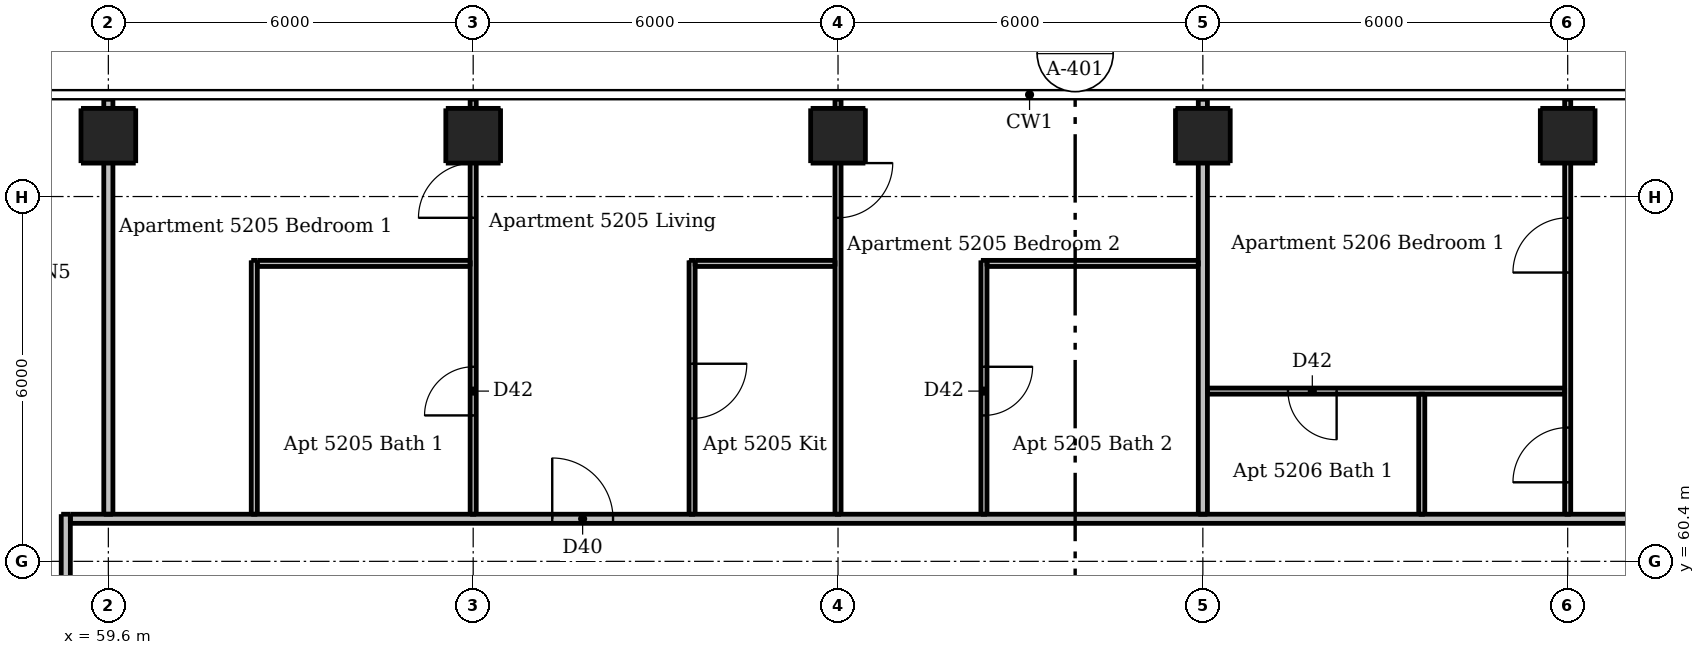
"""IFC4 building model, lengths in metres.
Left out: names, types, materials, properties, quantities, classifications, styles, units other than length and angle.
Written with IfcOpenShell. Run it as: python <this file> out.ifc"""

import sys

from ifc_helpers import new_model, si_unit, direction, frame, frame_2d, origin, origin_2d, place, context, subcontext, project, spatial, rectangle, extrude, element, fill, save


model = new_model("IFC4")
c1 = context("Model", 3, precision=1e-05, world=origin(), true_north=direction((0.0, 1.0)))
c2 = subcontext(c1, "Body", "Model", "MODEL_VIEW")
j1 = project(units=[si_unit("LENGTHUNIT", "METRE"), si_unit("PLANEANGLEUNIT", "RADIAN")], contexts=[c1])
p1 = place(None, origin())
s1 = spatial("IfcSite", under=j1, at=p1, CompositionType="ELEMENT")
p2 = place(p1, origin())
s2 = spatial("IfcBuilding", under=s1, at=p2, CompositionType="ELEMENT")
p3 = place(p2, frame((0.0, 0.0, 196.9)))
s3 = spatial("IfcBuildingStorey", under=s2, at=p3, CompositionType="ELEMENT", Elevation=196.9)
for number, where, z_axis, x_axis in (
    (1, (59.6, 67.4, 0.0), (0.0, 0.0, 1.0), (1.0, 0.0, 0.0)),
    (2, (65.6, 67.4, 0.0), (0.0, 0.0, 1.0), (1.0, 0.0, 0.0)),
    (3, (71.6, 67.4, 0.0), (0.0, 0.0, 1.0), (1.0, 0.0, 0.0)),
    (4, (77.6, 67.4, 0.0), (0.0, 0.0, 1.0), (1.0, 0.0, 0.0)),
    (5, (83.6, 67.4, 0.0), (0.0, 0.0, 1.0), (1.0, 0.0, 0.0)),
):
    element("IfcColumn", number, at=place(p3, frame(where, z_axis=z_axis, x_axis=x_axis)), inside=s3, PredefinedType="COLUMN", context=c2, shape_type="SweptSolid", body=[
        extrude(rectangle(XDim=0.9, YDim=0.9, at=origin_2d()), origin(), (0.0, 0.0, 1.0), 3.05),
    ])
p4 = place(p3, frame((62.0, 61.175, 0.0), z_axis=(0.0, 0.0, 1.0), x_axis=(0.0, 1.0, 0.0)))
e6 = element("IfcWall", 6, at=p4, inside=s3, PredefinedType="PARTITIONING", context=c2, shape_type="SweptSolid", body=[
    extrude(rectangle(XDim=4.175, YDim=0.1, at=frame_2d((2.087, 0.0))), origin(), (0.0, 0.0, 1.0), 3.05),
])
p5 = place(p3, frame((65.6, 61.175, 0.0), z_axis=(0.0, 0.0, 1.0), x_axis=(0.0, 1.0, 0.0)))
e7 = element("IfcWall", 7, at=p5, inside=s3, PredefinedType="PARTITIONING", context=c2, shape_type="SweptSolid", body=[
    extrude(rectangle(XDim=6.825, YDim=0.1, at=frame_2d((3.413, 0.0))), origin(), (0.0, 0.0, 1.0), 2.516),
])
p6 = place(p5, frame((4.875, 0.0, 0.0)))
e8 = element("IfcOpeningElement", 8, at=p6, cuts=e7, PredefinedType="OPENING", context=c2, shape_type="SweptSolid", body=[
    extrude(rectangle(XDim=0.9, YDim=2.1, at=frame_2d((0.45, 1.05))), frame((0.0, 0.06, 0.0), z_axis=(0.0, -1.0, 0.0), x_axis=(1.0, 0.0, 0.0)), (0.0, 0.0, 1.0), 0.12),
])
p7 = place(p5, frame((1.625, 0.0, 0.0)))
e9 = element("IfcOpeningElement", 9, at=p7, cuts=e7, PredefinedType="OPENING", context=c2, shape_type="SweptSolid", body=[
    extrude(rectangle(XDim=0.8, YDim=2.1, at=frame_2d((0.4, 1.05))), frame((0.0, 0.06, 0.0), z_axis=(0.0, -1.0, 0.0), x_axis=(1.0, 0.0, 0.0)), (0.0, 0.0, 1.0), 0.12),
])
p8 = place(p3, frame((69.2, 65.35, 0.0), z_axis=(0.0, 0.0, 1.0), x_axis=(0.0, -1.0, 0.0)))
e10 = element("IfcWall", 10, at=p8, inside=s3, PredefinedType="PARTITIONING", context=c2, shape_type="SweptSolid", body=[
    extrude(rectangle(XDim=4.175, YDim=0.1, at=frame_2d((2.087, 0.0))), origin(), (0.0, 0.0, 1.0), 3.05),
])
p9 = place(p8, frame((1.7, 0.0, 0.0)))
e11 = element("IfcOpeningElement", 11, at=p9, cuts=e10, PredefinedType="OPENING", context=c2, shape_type="SweptSolid", body=[
    extrude(rectangle(XDim=0.9, YDim=2.1, at=frame_2d((0.45, 1.05))), frame((0.0, 0.06, 0.0), z_axis=(0.0, -1.0, 0.0), x_axis=(1.0, 0.0, 0.0)), (0.0, 0.0, 1.0), 0.12),
])
p10 = place(p3, frame((71.6, 68.0, 0.0), z_axis=(0.0, 0.0, 1.0), x_axis=(0.0, -1.0, 0.0)))
e12 = element("IfcWall", 12, at=p10, inside=s3, PredefinedType="PARTITIONING", context=c2, shape_type="SweptSolid", body=[
    extrude(rectangle(XDim=6.825, YDim=0.1, at=frame_2d((3.413, 0.0))), origin(), (0.0, 0.0, 1.0), 2.516),
])
p11 = place(p10, frame((1.05, 0.0, 0.0)))
e13 = element("IfcOpeningElement", 13, at=p11, cuts=e12, PredefinedType="OPENING", context=c2, shape_type="SweptSolid", body=[
    extrude(rectangle(XDim=0.9, YDim=2.1, at=frame_2d((0.45, 1.05))), frame((0.0, 0.06, 0.0), z_axis=(0.0, -1.0, 0.0), x_axis=(1.0, 0.0, 0.0)), (0.0, 0.0, 1.0), 0.12),
])
p12 = place(p3, frame((74.0, 65.35, 0.0), z_axis=(0.0, 0.0, 1.0), x_axis=(0.0, -1.0, 0.0)))
e14 = element("IfcWall", 14, at=p12, inside=s3, PredefinedType="PARTITIONING", context=c2, shape_type="SweptSolid", body=[
    extrude(rectangle(XDim=4.175, YDim=0.1, at=frame_2d((2.087, 0.0))), origin(), (0.0, 0.0, 1.0), 3.05),
])
p13 = place(p12, frame((1.75, 0.0, 0.0)))
e15 = element("IfcOpeningElement", 15, at=p13, cuts=e14, PredefinedType="OPENING", context=c2, shape_type="SweptSolid", body=[
    extrude(rectangle(XDim=0.8, YDim=2.1, at=frame_2d((0.4, 1.05))), frame((0.0, 0.06, 0.0), z_axis=(0.0, -1.0, 0.0), x_axis=(1.0, 0.0, 0.0)), (0.0, 0.0, 1.0), 0.12),
])
p14 = place(p3, frame((81.2, 61.175, 0.0), z_axis=(0.0, 0.0, 1.0), x_axis=(0.0, 1.0, 0.0)))
e16 = element("IfcWall", 16, at=p14, inside=s3, PredefinedType="PARTITIONING", context=c2, shape_type="SweptSolid", body=[
    extrude(rectangle(XDim=1.975, YDim=0.1, at=frame_2d((0.987, 0.0))), origin(), (0.0, 0.0, 1.0), 3.05),
])
p15 = place(p3, frame((83.6, 61.175, 0.0), z_axis=(0.0, 0.0, 1.0), x_axis=(0.0, 1.0, 0.0)))
e17 = element("IfcWall", 17, at=p15, inside=s3, PredefinedType="PARTITIONING", context=c2, shape_type="SweptSolid", body=[
    extrude(rectangle(XDim=6.825, YDim=0.1, at=frame_2d((3.413, 0.0))), origin(), (0.0, 0.0, 1.0), 2.516),
])
p16 = place(p15, frame((0.525, 0.0, 0.0)))
e18 = element("IfcOpeningElement", 18, at=p16, cuts=e17, PredefinedType="OPENING", context=c2, shape_type="SweptSolid", body=[
    extrude(rectangle(XDim=0.9, YDim=2.1, at=frame_2d((0.45, 1.05))), frame((0.0, 0.06, 0.0), z_axis=(0.0, -1.0, 0.0), x_axis=(1.0, 0.0, 0.0)), (0.0, 0.0, 1.0), 0.12),
])
p17 = place(p15, frame((3.975, 0.0, 0.0)))
e19 = element("IfcOpeningElement", 19, at=p17, cuts=e17, PredefinedType="OPENING", context=c2, shape_type="SweptSolid", body=[
    extrude(rectangle(XDim=0.9, YDim=2.1, at=frame_2d((0.45, 1.05))), frame((0.0, 0.06, 0.0), z_axis=(0.0, -1.0, 0.0), x_axis=(1.0, 0.0, 0.0)), (0.0, 0.0, 1.0), 0.12),
])
p18 = place(p3, frame((62.05, 65.3, 0.0), z_axis=(0.0, 0.0, 1.0), x_axis=(1.0, 0.0, 0.0)))
e20 = element("IfcWall", 20, at=p18, inside=s3, PredefinedType="PARTITIONING", context=c2, shape_type="SweptSolid", body=[
    extrude(rectangle(XDim=3.5, YDim=0.1, at=frame_2d((1.75, 0.0))), origin(), (0.0, 0.0, 1.0), 3.05),
])
p19 = place(p3, frame((69.25, 65.3, 0.0), z_axis=(0.0, 0.0, 1.0), x_axis=(1.0, 0.0, 0.0)))
e21 = element("IfcWall", 21, at=p19, inside=s3, PredefinedType="PARTITIONING", context=c2, shape_type="SweptSolid", body=[
    extrude(rectangle(XDim=2.3, YDim=0.1, at=frame_2d((1.15, 0.0))), origin(), (0.0, 0.0, 1.0), 3.05),
])
p20 = place(p3, frame((74.05, 65.3, 0.0), z_axis=(0.0, 0.0, 1.0), x_axis=(1.0, 0.0, 0.0)))
e22 = element("IfcWall", 22, at=p20, inside=s3, PredefinedType="PARTITIONING", context=c2, shape_type="SweptSolid", body=[
    extrude(rectangle(XDim=3.475, YDim=0.1, at=frame_2d((1.737, 0.0))), origin(), (0.0, 0.0, 1.0), 3.05),
])
p21 = place(p3, frame((83.55, 63.2, 0.0), z_axis=(0.0, 0.0, 1.0), x_axis=(-1.0, 0.0, 0.0)))
e23 = element("IfcWall", 23, at=p21, inside=s3, PredefinedType="PARTITIONING", context=c2, shape_type="SweptSolid", body=[
    extrude(rectangle(XDim=5.875, YDim=0.1, at=frame_2d((2.938, 0.0))), origin(), (0.0, 0.0, 1.0), 3.05),
])
p22 = place(p21, frame((3.75, 0.0, 0.0)))
e24 = element("IfcOpeningElement", 24, at=p22, cuts=e23, PredefinedType="OPENING", context=c2, shape_type="SweptSolid", body=[
    extrude(rectangle(XDim=0.8, YDim=2.1, at=frame_2d((0.4, 1.05))), frame((0.0, 0.06, 0.0), z_axis=(0.0, -1.0, 0.0), x_axis=(1.0, 0.0, 0.0)), (0.0, 0.0, 1.0), 0.12),
])
p23 = place(p3, frame((58.9, 30.325, 0.0), z_axis=(0.0, 0.0, 1.0), x_axis=(0.0, 1.0, 0.0)))
e25 = element("IfcWall", 25, at=p23, inside=s3, PredefinedType="PARTITIONING", context=c2, shape_type="SweptSolid", body=[
    extrude(rectangle(XDim=30.85, YDim=0.15, at=frame_2d((15.425, 0.0))), origin(), (0.0, 0.0, 1.0), 3.05),
])
p24 = place(p23, frame((7.375, 0.0, 0.0)))
e26 = element("IfcOpeningElement", 26, at=p24, cuts=e25, PredefinedType="OPENING", context=c2, shape_type="SweptSolid", body=[
    extrude(rectangle(XDim=1.0, YDim=2.1, at=frame_2d((0.5, 1.05))), frame((0.0, 0.085, 0.0), z_axis=(0.0, -1.0, 0.0), x_axis=(1.0, 0.0, 0.0)), (0.0, 0.0, 1.0), 0.17),
])
p25 = place(p23, frame((26.925, 0.0, 0.0)))
e27 = element("IfcOpeningElement", 27, at=p25, cuts=e25, PredefinedType="OPENING", context=c2, shape_type="SweptSolid", body=[
    extrude(rectangle(XDim=1.0, YDim=2.1, at=frame_2d((0.5, 1.05))), frame((0.0, 0.085, 0.0), z_axis=(0.0, -1.0, 0.0), x_axis=(1.0, 0.0, 0.0)), (0.0, 0.0, 1.0), 0.17),
])
p26 = place(p3, frame((59.6, 61.175, 0.0), z_axis=(0.0, 0.0, 1.0), x_axis=(0.0, 1.0, 0.0)))
e28 = element("IfcWall", 28, at=p26, inside=s3, PredefinedType="PARTITIONING", context=c2, shape_type="SweptSolid", body=[
    extrude(rectangle(XDim=6.825, YDim=0.15, at=frame_2d((3.413, 0.0))), origin(), (0.0, 0.0, 1.0), 2.51),
])
p27 = place(p3, frame((77.6, 61.175, 0.0), z_axis=(0.0, 0.0, 1.0), x_axis=(0.0, 1.0, 0.0)))
e29 = element("IfcWall", 29, at=p27, inside=s3, PredefinedType="PARTITIONING", context=c2, shape_type="SweptSolid", body=[
    extrude(rectangle(XDim=6.825, YDim=0.15, at=frame_2d((3.413, 0.0))), origin(), (0.0, 0.0, 1.0), 2.516),
])
p28 = place(p3, frame((58.975, 61.1, 0.0), z_axis=(0.0, 0.0, 1.0), x_axis=(1.0, 0.0, 0.0)))
e30 = element("IfcWall", 30, at=p28, inside=s3, PredefinedType="PARTITIONING", context=c2, shape_type="SweptSolid", body=[
    extrude(rectangle(XDim=29.25, YDim=0.15, at=frame_2d((14.625, 0.0))), origin(), (0.0, 0.0, 1.0), 3.05),
])
p29 = place(p28, frame((7.925, 0.0, 0.0)))
e31 = element("IfcOpeningElement", 31, at=p29, cuts=e30, PredefinedType="OPENING", context=c2, shape_type="SweptSolid", body=[
    extrude(rectangle(XDim=1.0, YDim=2.1, at=frame_2d((0.5, 1.05))), frame((0.0, 0.085, 0.0), z_axis=(0.0, -1.0, 0.0), x_axis=(1.0, 0.0, 0.0)), (0.0, 0.0, 1.0), 0.17),
])
p30 = place(p28, frame((26.475, 0.0, 0.0)))
e32 = element("IfcOpeningElement", 32, at=p30, cuts=e30, PredefinedType="OPENING", context=c2, shape_type="SweptSolid", body=[
    extrude(rectangle(XDim=1.0, YDim=2.1, at=frame_2d((0.5, 1.05))), frame((0.0, 0.085, 0.0), z_axis=(0.0, -1.0, 0.0), x_axis=(1.0, 0.0, 0.0)), (0.0, 0.0, 1.0), 0.17),
])
p31 = place(p29, origin())
e33 = element("IfcDoor", 33, at=p31, inside=s3, OperationType="SINGLE_SWING_LEFT", PredefinedType="DOOR", context=c2, shape_type="SweptSolid", body=[
    extrude(rectangle(XDim=1.0, YDim=2.1, at=frame_2d((0.5, 1.05))), frame((0.0, 0.025, 0.0), z_axis=(0.0, -1.0, 0.0), x_axis=(1.0, 0.0, 0.0)), (0.0, 0.0, 1.0), 0.05),
])
fill(e31, e33)
p32 = place(p9, origin())
e34 = element("IfcDoor", 34, at=p32, inside=s3, OperationType="SINGLE_SWING_LEFT", PredefinedType="DOOR", context=c2, shape_type="SweptSolid", body=[
    extrude(rectangle(XDim=0.9, YDim=2.1, at=frame_2d((0.45, 1.05))), frame((0.0, 0.025, 0.0), z_axis=(0.0, -1.0, 0.0), x_axis=(1.0, 0.0, 0.0)), (0.0, 0.0, 1.0), 0.05),
])
fill(e11, e34)
p33 = place(p6, origin())
e35 = element("IfcDoor", 35, at=p33, inside=s3, OperationType="SINGLE_SWING_LEFT", PredefinedType="DOOR", context=c2, shape_type="SweptSolid", body=[
    extrude(rectangle(XDim=0.9, YDim=2.1, at=frame_2d((0.45, 1.05))), frame((0.0, 0.025, 0.0), z_axis=(0.0, -1.0, 0.0), x_axis=(1.0, 0.0, 0.0)), (0.0, 0.0, 1.0), 0.05),
])
fill(e8, e35)
p34 = place(p7, origin())
e36 = element("IfcDoor", 36, at=p34, inside=s3, OperationType="SINGLE_SWING_LEFT", PredefinedType="DOOR", context=c2, shape_type="SweptSolid", body=[
    extrude(rectangle(XDim=0.8, YDim=2.1, at=frame_2d((0.4, 1.05))), frame((0.0, 0.025, 0.0), z_axis=(0.0, -1.0, 0.0), x_axis=(1.0, 0.0, 0.0)), (0.0, 0.0, 1.0), 0.05),
])
fill(e9, e36)
p35 = place(p11, origin())
e37 = element("IfcDoor", 37, at=p35, inside=s3, OperationType="SINGLE_SWING_LEFT", PredefinedType="DOOR", context=c2, shape_type="SweptSolid", body=[
    extrude(rectangle(XDim=0.9, YDim=2.1, at=frame_2d((0.45, 1.05))), frame((0.0, 0.025, 0.0), z_axis=(0.0, -1.0, 0.0), x_axis=(1.0, 0.0, 0.0)), (0.0, 0.0, 1.0), 0.05),
])
fill(e13, e37)
p36 = place(p13, origin())
e38 = element("IfcDoor", 38, at=p36, inside=s3, OperationType="SINGLE_SWING_LEFT", PredefinedType="DOOR", context=c2, shape_type="SweptSolid", body=[
    extrude(rectangle(XDim=0.8, YDim=2.1, at=frame_2d((0.4, 1.05))), frame((0.0, 0.025, 0.0), z_axis=(0.0, -1.0, 0.0), x_axis=(1.0, 0.0, 0.0)), (0.0, 0.0, 1.0), 0.05),
])
fill(e15, e38)
p37 = place(p16, origin())
e39 = element("IfcDoor", 39, at=p37, inside=s3, OperationType="SINGLE_SWING_LEFT", PredefinedType="DOOR", context=c2, shape_type="SweptSolid", body=[
    extrude(rectangle(XDim=0.9, YDim=2.1, at=frame_2d((0.45, 1.05))), frame((0.0, 0.025, 0.0), z_axis=(0.0, -1.0, 0.0), x_axis=(1.0, 0.0, 0.0)), (0.0, 0.0, 1.0), 0.05),
])
fill(e18, e39)
p38 = place(p17, origin())
e40 = element("IfcDoor", 40, at=p38, inside=s3, OperationType="SINGLE_SWING_LEFT", PredefinedType="DOOR", context=c2, shape_type="SweptSolid", body=[
    extrude(rectangle(XDim=0.9, YDim=2.1, at=frame_2d((0.45, 1.05))), frame((0.0, 0.025, 0.0), z_axis=(0.0, -1.0, 0.0), x_axis=(1.0, 0.0, 0.0)), (0.0, 0.0, 1.0), 0.05),
])
fill(e19, e40)
p39 = place(p22, origin())
e41 = element("IfcDoor", 41, at=p39, inside=s3, OperationType="SINGLE_SWING_LEFT", PredefinedType="DOOR", context=c2, shape_type="SweptSolid", body=[
    extrude(rectangle(XDim=0.8, YDim=2.1, at=frame_2d((0.4, 1.05))), frame((0.0, 0.025, 0.0), z_axis=(0.0, -1.0, 0.0), x_axis=(1.0, 0.0, 0.0)), (0.0, 0.0, 1.0), 0.05),
])
fill(e24, e41)
save(model, sys.argv[1])
